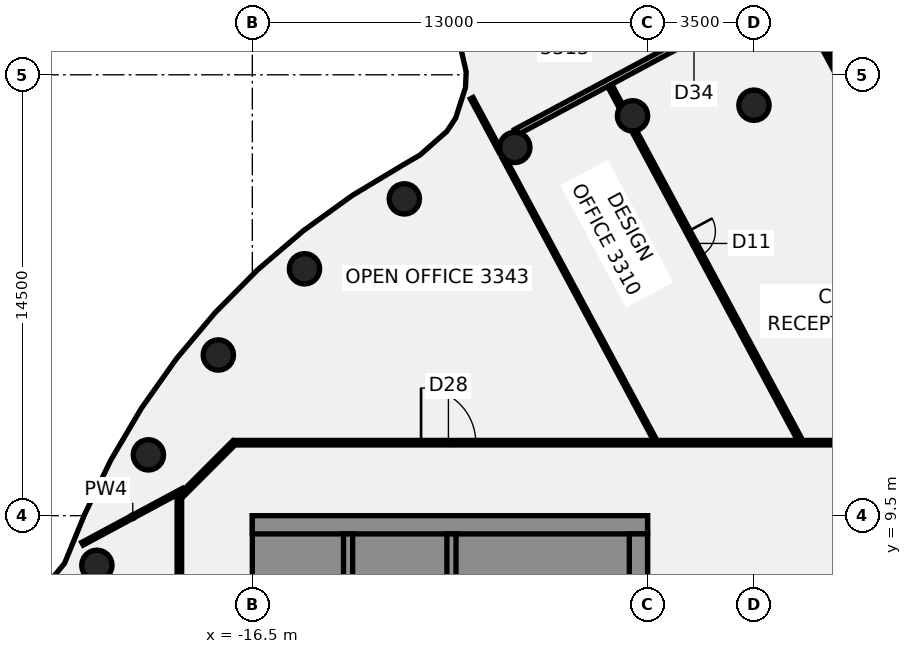
"""IFC4 building model, lengths in metres.
Left out: names, types, materials, properties, quantities, classifications, styles, units other than length and angle.
Written with IfcOpenShell. Run it as: python <this file> out.ifc"""

import sys

from ifc_helpers import new_model, si_unit, direction, frame, frame_2d, origin, origin_2d, place, context, subcontext, project, spatial, polyline, rectangle, circle, outline, extrude, element, fill, save


model = new_model("IFC4")
c1 = context("Model", 3, precision=1e-05, world=origin(), true_north=direction((0.0, 1.0)))
c2 = subcontext(c1, "Body", "Model", "MODEL_VIEW")
j1 = project(units=[si_unit("LENGTHUNIT", "METRE"), si_unit("PLANEANGLEUNIT", "RADIAN")], contexts=[c1])
p1 = place(None, origin())
s1 = spatial("IfcSite", under=j1, at=p1, CompositionType="ELEMENT")
p2 = place(p1, origin())
s2 = spatial("IfcBuilding", under=s1, at=p2, CompositionType="ELEMENT")
p3 = place(p2, frame((0.0, 0.0, 136.75)))
s3 = spatial("IfcBuildingStorey", under=s2, at=p3, CompositionType="ELEMENT", Elevation=136.75)
for number, where, z_axis, x_axis in (
    (1, (0.0, 23.0, -0.14), (0.0, 0.0, 1.0), (1.0, 0.0, 0.0)),
    (2, (-3.994, 22.651, -0.14), (0.0, 0.0, 1.0), (1.0, 0.0, 0.0)),
    (3, (-7.866, 21.613, -0.14), (0.0, 0.0, 1.0), (1.0, 0.0, 0.0)),
    (4, (-11.5, 19.919, -0.14), (0.0, 0.0, 1.0), (1.0, 0.0, 0.0)),
    (5, (-14.784, 17.619, -0.14), (0.0, 0.0, 1.0), (1.0, 0.0, 0.0)),
    (6, (-17.619, 14.784, -0.14), (0.0, 0.0, 1.0), (1.0, 0.0, 0.0)),
    (7, (-19.919, 11.5, -0.14), (0.0, 0.0, 1.0), (1.0, 0.0, 0.0)),
    (8, (-21.613, 7.866, -0.14), (0.0, 0.0, 1.0), (1.0, 0.0, 0.0)),
):
    element("IfcColumn", number, at=place(p3, frame(where, z_axis=z_axis, x_axis=x_axis)), inside=s3, PredefinedType="COLUMN", context=c2, shape_type="SweptSolid", body=[
        extrude(circle(Radius=0.5, at=origin_2d()), origin(), (0.0, 0.0, 1.0), 3.75),
    ])
p4 = place(p3, frame((-9.285, 23.232, 0.0), z_axis=(0.0, 0.0, 1.0), x_axis=(0.472677149277, -0.881235673672, 0.0)))
e9 = element("IfcWall", 9, at=p4, inside=s3, PredefinedType="PARTITIONING", context=c2, shape_type="SweptSolid", body=[
    extrude(rectangle(XDim=2.007, YDim=0.1, at=frame_2d((1.003, 0.0))), origin(), (0.0, 0.0, 1.0), 3.01),
])
p5 = place(p3, frame((-8.247, 21.297, 0.0), z_axis=(0.0, 0.0, 1.0), x_axis=(0.472660277338, -0.881244723234, 0.0)))
e10 = element("IfcWall", 10, at=p5, inside=s3, PredefinedType="PARTITIONING", context=c2, shape_type="SweptSolid", body=[
    extrude(rectangle(XDim=10.573, YDim=0.1, at=frame_2d((5.287, 0.0))), origin(), (0.0, 0.0, 1.0), 3.01),
])
p6 = place(p3, frame((-4.745, 23.653, 0.0), z_axis=(0.0, 0.0, 1.0), x_axis=(0.472438455884, -0.881363662401, 0.0)))
e11 = element("IfcWall", 11, at=p6, inside=s3, PredefinedType="PARTITIONING", context=c2, shape_type="SweptSolid", body=[
    extrude(rectangle(XDim=0.78, YDim=0.15, at=frame_2d((0.39, 0.0))), origin(), (0.0, 0.0, 1.0), 3.01),
])
p7 = place(p3, frame((-3.941, 22.155, 0.0), z_axis=(0.0, 0.0, 1.0), x_axis=(0.472663740914, -0.881242865517, 0.0)))
e12 = element("IfcWall", 12, at=p7, inside=s3, PredefinedType="PARTITIONING", context=c2, shape_type="SweptSolid", body=[
    extrude(rectangle(XDim=11.532, YDim=0.15, at=frame_2d((5.766, 0.0))), origin(), (0.0, 0.0, 1.0), 3.01),
])
p8 = place(p7, frame((3.75, 0.0, 0.0)))
e13 = element("IfcOpeningElement", 13, at=p8, cuts=e12, PredefinedType="OPENING", context=c2, shape_type="SweptSolid", body=[
    extrude(rectangle(XDim=0.9, YDim=2.1, at=frame_2d((0.45, 1.05))), frame((0.0, 0.085, 0.0), z_axis=(0.0, -1.0, 0.0), x_axis=(1.0, 0.0, 0.0)), (0.0, 0.0, 1.0), 0.17),
])
p9 = place(p3, frame((1.25, 26.864, 0.0), z_axis=(0.0, 0.0, 1.0), x_axis=(0.472715386163, -0.881215163104, 0.0)))
e14 = element("IfcWall", 14, at=p9, inside=s3, PredefinedType="PARTITIONING", context=c2, shape_type="SweptSolid", body=[
    extrude(rectangle(XDim=4.745, YDim=0.15, at=frame_2d((2.373, 0.0))), origin(), (0.0, 0.0, 1.0), 3.01),
])
p10 = place(p3, frame((-17.065, 11.9, 0.0), z_axis=(0.0, 0.0, 1.0), x_axis=(1.0, 0.0, 0.0)))
e15 = element("IfcWall", 15, at=p10, inside=s3, PredefinedType="PARTITIONING", context=c2, shape_type="SweptSolid", body=[
    extrude(rectangle(XDim=34.165, YDim=0.15, at=frame_2d((17.083, 0.0))), origin(), (0.0, 0.0, 1.0), 3.01),
])
p11 = place(p10, frame((21.624, 0.0, 0.0)))
e16 = element("IfcOpeningElement", 16, at=p11, cuts=e15, PredefinedType="OPENING", context=c2, shape_type="SweptSolid", body=[
    extrude(rectangle(XDim=1.8, YDim=2.1, at=frame_2d((0.9, 1.05))), frame((0.0, 0.085, 0.0), z_axis=(0.0, -1.0, 0.0), x_axis=(1.0, 0.0, 0.0)), (0.0, 0.0, 1.0), 0.17),
])
p12 = place(p10, frame((29.953, 0.0, 0.0)))
e17 = element("IfcOpeningElement", 17, at=p12, cuts=e15, PredefinedType="OPENING", context=c2, shape_type="SweptSolid", body=[
    extrude(rectangle(XDim=1.8, YDim=2.1, at=frame_2d((0.9, 1.05))), frame((0.0, 0.085, 0.0), z_axis=(0.0, -1.0, 0.0), x_axis=(1.0, 0.0, 0.0)), (0.0, 0.0, 1.0), 0.17),
])
p13 = place(p10, frame((6.115, 0.0, 0.0)))
e18 = element("IfcOpeningElement", 18, at=p13, cuts=e15, PredefinedType="OPENING", context=c2, shape_type="SweptSolid", body=[
    extrude(rectangle(XDim=1.8, YDim=2.1, at=frame_2d((0.9, 1.05))), frame((0.0, 0.085, 0.0), z_axis=(0.0, -1.0, 0.0), x_axis=(1.0, 0.0, 0.0)), (0.0, 0.0, 1.0), 0.17),
])
p14 = place(p3, frame((-22.087, 8.577, 0.0), z_axis=(0.0, 0.0, 1.0), x_axis=(0.881198580013, 0.472746298329, 0.0)))
e19 = element("IfcWall", 19, at=p14, inside=s3, PredefinedType="PARTITIONING", context=c2, shape_type="SweptSolid", body=[
    extrude(rectangle(XDim=3.755, YDim=0.1, at=frame_2d((1.878, 0.0))), origin(), (0.0, 0.0, 1.0), 3.01),
])
p15 = place(p3, frame((-7.829, 22.113, 0.0), z_axis=(0.0, 0.0, 1.0), x_axis=(0.881304927749, 0.472548012719, 0.0)))
e20 = element("IfcWall", 20, at=p15, inside=s3, PredefinedType="PARTITIONING", context=c2, shape_type="SweptSolid", body=[
    extrude(rectangle(XDim=13.544, YDim=0.2, at=frame_2d((6.772, 0.0))), origin(), (0.0, 0.0, 1.0), 3.01),
])
p16 = place(p15, frame((5.945, 0.0, 0.0)))
e21 = element("IfcOpeningElement", 21, at=p16, cuts=e20, PredefinedType="OPENING", context=c2, shape_type="SweptSolid", body=[
    extrude(rectangle(XDim=1.4, YDim=2.1, at=frame_2d((0.7, 1.05))), frame((0.0, 0.11, 0.0), z_axis=(0.0, -1.0, 0.0), x_axis=(1.0, 0.0, 0.0)), (0.0, 0.0, 1.0), 0.22),
])
p17 = place(p15, frame((8.945, 0.0, 0.0)))
e22 = element("IfcOpeningElement", 22, at=p17, cuts=e20, PredefinedType="OPENING", context=c2, shape_type="SweptSolid", body=[
    extrude(rectangle(XDim=0.9, YDim=2.1, at=frame_2d((0.45, 1.05))), frame((0.0, 0.11, 0.0), z_axis=(0.0, -1.0, 0.0), x_axis=(1.0, 0.0, 0.0)), (0.0, 0.0, 1.0), 0.22),
])
p18 = place(p3, frame((-18.872, 10.128, 0.0), z_axis=(0.0, 0.0, 1.0), x_axis=(0.707106781187, 0.707106781187, 0.0)))
e23 = element("IfcWall", 23, at=p18, inside=s3, PredefinedType="PARTITIONING", context=c2, shape_type="SweptSolid", body=[
    extrude(rectangle(XDim=2.505, YDim=0.15, at=frame_2d((1.253, 0.0))), origin(), (0.0, 0.0, 1.0), 3.01),
])
p19 = place(p3, frame((-18.9, -10.1, 0.0), z_axis=(0.0, 0.0, 1.0), x_axis=(0.0, 1.0, 0.0)))
e24 = element("IfcWall", 24, at=p19, inside=s3, PredefinedType="PARTITIONING", context=c2, shape_type="SweptSolid", body=[
    extrude(rectangle(XDim=20.2, YDim=0.15, at=frame_2d((10.1, 0.0))), origin(), (0.0, 0.0, 1.0), 3.01),
])
p20 = place(p19, frame((11.805, 0.0, 0.0)))
e25 = element("IfcOpeningElement", 25, at=p20, cuts=e24, PredefinedType="OPENING", context=c2, shape_type="SweptSolid", body=[
    extrude(rectangle(XDim=1.8, YDim=2.1, at=frame_2d((0.9, 1.05))), frame((0.0, 0.085, 0.0), z_axis=(0.0, -1.0, 0.0), x_axis=(1.0, 0.0, 0.0)), (0.0, 0.0, 1.0), 0.17),
])
p21 = place(p19, frame((4.489, 0.0, 0.0)))
e26 = element("IfcOpeningElement", 26, at=p21, cuts=e24, PredefinedType="OPENING", context=c2, shape_type="SweptSolid", body=[
    extrude(rectangle(XDim=0.9, YDim=2.1, at=frame_2d((0.45, 1.05))), frame((0.0, 0.085, 0.0), z_axis=(0.0, -1.0, 0.0), x_axis=(1.0, 0.0, 0.0)), (0.0, 0.0, 1.0), 0.17),
])
p22 = place(p3, origin())
e27 = element("IfcWall", 27, at=p22, inside=s3, PredefinedType="SHEAR", context=c2, shape_type="SweptSolid", body=[
    extrude(outline(polyline([(-13.5, -8.125), (-15.9, -8.125), (-15.9, -5.625), (-13.5, -5.625), (-13.5, -5.375), (-15.9, -5.375), (-15.9, 5.375), (-13.5, 5.375), (-13.5, 5.625), (-15.9, 5.625), (-15.9, 8.125), (-13.5, 8.125), (-13.5, 8.9), (-15.9, 8.9), (-16.5, 8.9), (-16.5, -8.9), (-15.9, -8.9), (-13.5, -8.9), (-13.5, -8.125)])), origin(), (0.0, 0.0, 1.0), 3.61),
])
p23 = place(p3, frame((-16.5, 9.2, 0.0), z_axis=(0.0, 0.0, 1.0), x_axis=(1.0, 0.0, 0.0)))
e28 = element("IfcWall", 28, at=p23, inside=s3, PredefinedType="SHEAR", context=c2, shape_type="SweptSolid", body=[
    extrude(rectangle(XDim=13.0, YDim=0.6, at=frame_2d((6.5, 0.0))), origin(), (0.0, 0.0, 1.0), 3.61),
])
p24 = place(p3, origin())
e29 = element("IfcWall", 29, at=p24, inside=s3, PredefinedType="SHEAR", context=c2, shape_type="SweptSolid", body=[
    extrude(outline(polyline([(-9.8, -5.375), (-9.8, -5.625), (-7.5, -5.625), (-7.2, -5.625), (-7.2, 8.9), (-7.5, 8.9), (-9.8, 8.9), (-9.8, 8.125), (-7.5, 8.125), (-7.5, 5.625), (-9.8, 5.625), (-9.8, 5.375), (-7.5, 5.375), (-7.5, 2.875), (-9.8, 2.875), (-9.8, 2.625), (-7.5, 2.625), (-7.5, 0.125), (-9.8, 0.125), (-9.8, -0.125), (-7.5, -0.125), (-7.5, -2.625), (-9.8, -2.625), (-9.8, -2.875), (-7.5, -2.875), (-7.5, -5.375), (-9.8, -5.375)])), origin(), (0.0, 0.0, 1.0), 3.61),
])
p25 = place(p3, frame((-13.35, -8.9, 0.0), z_axis=(0.0, 0.0, 1.0), x_axis=(0.0, 1.0, 0.0)))
e30 = element("IfcWall", 30, at=p25, inside=s3, PredefinedType="SHEAR", context=c2, shape_type="SweptSolid", body=[
    extrude(rectangle(XDim=17.8, YDim=0.3, at=frame_2d((8.9, 0.0))), origin(), (0.0, 0.0, 1.0), 3.61),
])
p26 = place(p25, frame((1.325, 0.0, 0.0)))
e31 = element("IfcOpeningElement", 31, at=p26, cuts=e30, PredefinedType="OPENING", context=c2, shape_type="SweptSolid", body=[
    extrude(rectangle(XDim=1.4, YDim=2.1, at=frame_2d((0.7, 1.05))), frame((0.0, 0.16, 0.0), z_axis=(0.0, -1.0, 0.0), x_axis=(1.0, 0.0, 0.0)), (0.0, 0.0, 1.0), 0.32),
])
p27 = place(p25, frame((4.754, 0.0, 0.0)))
e32 = element("IfcOpeningElement", 32, at=p27, cuts=e30, PredefinedType="OPENING", context=c2, shape_type="SweptSolid", body=[
    extrude(rectangle(XDim=1.0, YDim=2.1, at=frame_2d((0.5, 1.05))), frame((0.0, 0.16, 0.0), z_axis=(0.0, -1.0, 0.0), x_axis=(1.0, 0.0, 0.0)), (0.0, 0.0, 1.0), 0.32),
])
p28 = place(p25, frame((10.254, 0.0, 0.0)))
e33 = element("IfcOpeningElement", 33, at=p28, cuts=e30, PredefinedType="OPENING", context=c2, shape_type="SweptSolid", body=[
    extrude(rectangle(XDim=1.0, YDim=2.1, at=frame_2d((0.5, 1.05))), frame((0.0, 0.16, 0.0), z_axis=(0.0, -1.0, 0.0), x_axis=(1.0, 0.0, 0.0)), (0.0, 0.0, 1.0), 0.32),
])
p29 = place(p3, frame((-9.95, -8.9, 0.0), z_axis=(0.0, 0.0, 1.0), x_axis=(0.0, 1.0, 0.0)))
e34 = element("IfcWall", 34, at=p29, inside=s3, PredefinedType="SHEAR", context=c2, shape_type="SweptSolid", body=[
    extrude(rectangle(XDim=17.8, YDim=0.3, at=frame_2d((8.9, 0.0))), origin(), (0.0, 0.0, 1.0), 3.61),
])
p30 = place(p29, frame((4.175, 0.0, 0.0)))
e35 = element("IfcOpeningElement", 35, at=p30, cuts=e34, PredefinedType="OPENING", context=c2, shape_type="SweptSolid", body=[
    extrude(rectangle(XDim=1.2, YDim=2.1, at=frame_2d((0.6, 1.05))), frame((0.0, 0.16, 0.0), z_axis=(0.0, -1.0, 0.0), x_axis=(1.0, 0.0, 0.0)), (0.0, 0.0, 1.0), 0.32),
])
p31 = place(p29, frame((6.925, 0.0, 0.0)))
e36 = element("IfcOpeningElement", 36, at=p31, cuts=e34, PredefinedType="OPENING", context=c2, shape_type="SweptSolid", body=[
    extrude(rectangle(XDim=1.2, YDim=2.1, at=frame_2d((0.6, 1.05))), frame((0.0, 0.16, 0.0), z_axis=(0.0, -1.0, 0.0), x_axis=(1.0, 0.0, 0.0)), (0.0, 0.0, 1.0), 0.32),
])
p32 = place(p3, frame((-3.8, -8.9, 0.0), z_axis=(0.0, 0.0, 1.0), x_axis=(0.0, 1.0, 0.0)))
e37 = element("IfcWall", 37, at=p32, inside=s3, PredefinedType="SHEAR", context=c2, shape_type="SweptSolid", body=[
    extrude(rectangle(XDim=17.8, YDim=0.6, at=frame_2d((8.9, 0.0))), origin(), (0.0, 0.0, 1.0), 3.61),
])
p33 = place(p32, frame((1.25, 0.0, 0.0)))
e38 = element("IfcOpeningElement", 38, at=p33, cuts=e37, PredefinedType="OPENING", context=c2, shape_type="SweptSolid", body=[
    extrude(rectangle(XDim=1.8, YDim=2.1, at=frame_2d((0.9, 1.05))), frame((0.0, 0.31, 0.0), z_axis=(0.0, -1.0, 0.0), x_axis=(1.0, 0.0, 0.0)), (0.0, 0.0, 1.0), 0.62),
])
p34 = place(p32, frame((13.8, 0.0, 0.0)))
e39 = element("IfcOpeningElement", 39, at=p34, cuts=e37, PredefinedType="OPENING", context=c2, shape_type="SweptSolid", body=[
    extrude(rectangle(XDim=1.0, YDim=2.1, at=frame_2d((0.5, 1.05))), frame((0.0, 0.31, 0.0), z_axis=(0.0, -1.0, 0.0), x_axis=(1.0, 0.0, 0.0)), (0.0, 0.0, 1.0), 0.62),
])
p35 = place(p8, frame((0.9, 0.0, 0.0), z_axis=(0.0, 0.0, 1.0), x_axis=(-1.0, 0.0, 0.0)))
e40 = element("IfcDoor", 40, at=p35, inside=s3, OperationType="SINGLE_SWING_LEFT", PredefinedType="DOOR", context=c2, shape_type="SweptSolid", body=[
    extrude(rectangle(XDim=0.9, YDim=2.1, at=frame_2d((0.45, 1.05))), frame((0.0, 0.025, 0.0), z_axis=(0.0, -1.0, 0.0), x_axis=(1.0, 0.0, 0.0)), (0.0, 0.0, 1.0), 0.05),
])
fill(e13, e40)
p36 = place(p13, origin())
e41 = element("IfcDoor", 41, at=p36, inside=s3, OperationType="DOUBLE_DOOR_SINGLE_SWING", PredefinedType="DOOR", context=c2, shape_type="SweptSolid", body=[
    extrude(rectangle(XDim=1.8, YDim=2.1, at=frame_2d((0.9, 1.05))), frame((0.0, 0.025, 0.0), z_axis=(0.0, -1.0, 0.0), x_axis=(1.0, 0.0, 0.0)), (0.0, 0.0, 1.0), 0.05),
])
fill(e18, e41)
save(model, sys.argv[1])
